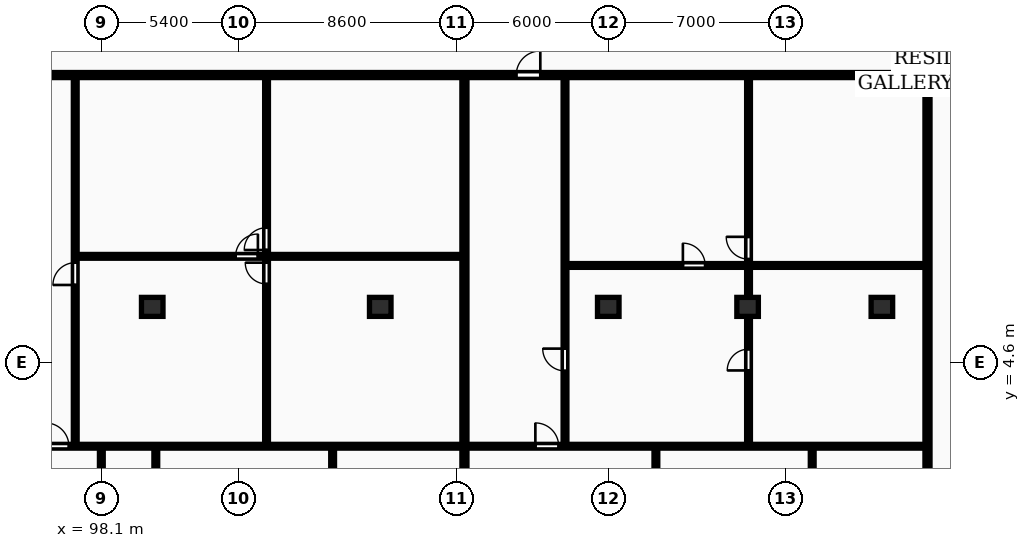
"""IFC4 building model, lengths in metres.
Left out: names, types, materials, properties, quantities, classifications, styles, units other than length and angle.
Written with IfcOpenShell. Run it as: python <this file> out.ifc"""

import sys

from ifc_helpers import new_model, si_unit, direction, frame, frame_2d, origin, origin_2d, place, context, subcontext, project, spatial, rectangle, extrude, element, fill, save


model = new_model("IFC4")
c1 = context("Model", 3, precision=1e-05, world=origin(), true_north=direction((0.0, 1.0)))
c2 = subcontext(c1, "Body", "Model", "MODEL_VIEW")
j1 = project(units=[si_unit("LENGTHUNIT", "METRE"), si_unit("PLANEANGLEUNIT", "RADIAN")], contexts=[c1])
p1 = place(None, origin())
s1 = spatial("IfcSite", under=j1, at=p1, CompositionType="ELEMENT")
p2 = place(p1, origin())
s2 = spatial("IfcBuilding", under=s1, at=p2, CompositionType="ELEMENT")
p3 = place(p2, frame((0.0, 0.0, 119.8)))
s3 = spatial("IfcBuildingStorey", under=s2, at=p3, CompositionType="ELEMENT", Elevation=119.8)
for number, where, z_axis, x_axis in (
    (1, (100.1, 6.8, 0.0), (0.0, 0.0, 1.0), (1.0, 0.0, 0.0)),
    (2, (109.1, 6.8, 0.0), (0.0, 0.0, 1.0), (1.0, 0.0, 0.0)),
    (3, (118.1, 6.8, 0.0), (0.0, 0.0, 1.0), (1.0, 0.0, 0.0)),
    (4, (123.6, 6.8, 0.0), (0.0, 0.0, 1.0), (1.0, 0.0, 0.0)),
    (5, (128.9, 6.8, 0.0), (0.0, 0.0, 1.0), (1.0, 0.0, 0.0)),
):
    element("IfcColumn", number, at=place(p3, frame(where, z_axis=z_axis, x_axis=x_axis)), inside=s3, PredefinedType="COLUMN", context=c2, shape_type="SweptSolid", body=[
        extrude(rectangle(XDim=0.85, YDim=0.75, at=origin_2d()), origin(), (0.0, 0.0, 1.0), 3.25),
    ])
for number, where, z_axis, x_axis in (
    (6, (130.7, -8.7, 0.0), (0.0, 0.0, 1.0), (0.0, 1.0, 0.0)),
    (7, (112.423, -8.7, 0.0), (0.0, 0.0, 1.0), (0.0, 1.0, 0.0)),
):
    element("IfcWall", number, at=place(p3, frame(where, z_axis=z_axis, x_axis=x_axis)), inside=s3, PredefinedType="PARTITIONING", context=c2, shape_type="SweptSolid", body=[
        extrude(rectangle(XDim=24.57, YDim=0.2, at=frame_2d((12.285, 0.0))), origin(), (0.0, 0.0, 1.0), 2.97),
    ])
p4 = place(p3, frame((104.612, 1.34, 0.0), z_axis=(0.0, 0.0, 1.0), x_axis=(0.0, 1.0, 0.0)))
e8 = element("IfcWall", 8, at=p4, inside=s3, PredefinedType="PARTITIONING", context=c2, shape_type="SweptSolid", body=[
    extrude(rectangle(XDim=14.55, YDim=0.15, at=frame_2d((7.275, 0.0))), origin(), (0.0, 0.0, 1.0), 2.97),
])
p5 = place(p4, frame((6.365, 0.0, 0.0)))
e9 = element("IfcOpeningElement", 9, at=p5, cuts=e8, PredefinedType="OPENING", context=c2, shape_type="SweptSolid", body=[
    extrude(rectangle(XDim=0.84, YDim=2.04, at=frame_2d((0.42, 1.02))), frame((0.0, 0.085, 0.0), z_axis=(0.0, -1.0, 0.0), x_axis=(1.0, 0.0, 0.0)), (0.0, 0.0, 1.0), 0.17),
])
p6 = place(p4, frame((7.705, 0.0, 0.0)))
e10 = element("IfcOpeningElement", 10, at=p6, cuts=e8, PredefinedType="OPENING", context=c2, shape_type="SweptSolid", body=[
    extrude(rectangle(XDim=0.88, YDim=2.06, at=frame_2d((0.44, 1.03))), frame((0.0, 0.085, 0.0), z_axis=(0.0, -1.0, 0.0), x_axis=(1.0, 0.0, 0.0)), (0.0, 0.0, 1.0), 0.17),
])
p7 = place(p3, frame((97.121, 8.795, 0.0), z_axis=(0.0, 0.0, 1.0), x_axis=(1.0, 0.0, 0.0)))
e11 = element("IfcWall", 11, at=p7, inside=s3, PredefinedType="PARTITIONING", context=c2, shape_type="SweptSolid", body=[
    extrude(rectangle(XDim=15.222, YDim=0.15, at=frame_2d((7.611, 0.0))), origin(), (0.0, 0.0, 1.0), 2.97),
])
p8 = place(p7, frame((6.27, 0.0, 0.0)))
e12 = element("IfcOpeningElement", 12, at=p8, cuts=e11, PredefinedType="OPENING", context=c2, shape_type="SweptSolid", body=[
    extrude(rectangle(XDim=0.88, YDim=2.06, at=frame_2d((0.44, 1.03))), frame((0.0, 0.085, 0.0), z_axis=(0.0, -1.0, 0.0), x_axis=(1.0, 0.0, 0.0)), (0.0, 0.0, 1.0), 0.17),
])
p9 = place(p3, frame((97.061, 1.34, 0.0), z_axis=(0.0, 0.0, 1.0), x_axis=(0.0, 1.0, 0.0)))
e13 = element("IfcWall", 13, at=p9, inside=s3, PredefinedType="PARTITIONING", context=c2, shape_type="SweptSolid", body=[
    extrude(rectangle(XDim=14.55, YDim=0.15, at=frame_2d((7.275, 0.0))), origin(), (0.0, 0.0, 1.0), 2.97),
])
p10 = place(p9, frame((6.325, 0.0, 0.0)))
e14 = element("IfcOpeningElement", 14, at=p10, cuts=e13, PredefinedType="OPENING", context=c2, shape_type="SweptSolid", body=[
    extrude(rectangle(XDim=0.88, YDim=2.06, at=frame_2d((0.44, 1.03))), frame((0.0, 0.085, 0.0), z_axis=(0.0, -1.0, 0.0), x_axis=(1.0, 0.0, 0.0)), (0.0, 0.0, 1.0), 0.17),
])
p11 = place(p3, frame((100.241, -1.21, 0.0), z_axis=(0.0, 0.0, 1.0), x_axis=(0.0, 1.0, 0.0)))
e15 = element("IfcWall", 15, at=p11, inside=s3, PredefinedType="PARTITIONING", context=c2, shape_type="SweptSolid", body=[
    extrude(rectangle(XDim=2.47, YDim=0.15, at=frame_2d((1.235, 0.0))), origin(), (0.0, 0.0, 1.0), 2.2),
])
p12 = place(p3, frame((98.091, -8.7, 0.0), z_axis=(0.0, 0.0, 1.0), x_axis=(0.0, 1.0, 0.0)))
e16 = element("IfcWall", 16, at=p12, inside=s3, PredefinedType="PARTITIONING", context=c2, shape_type="SweptSolid", body=[
    extrude(rectangle(XDim=9.96, YDim=0.15, at=frame_2d((4.98, 0.0))), origin(), (0.0, 0.0, 1.0), 2.97),
])
p13 = place(p12, frame((6.123, 0.0, 0.0)))
e17 = element("IfcOpeningElement", 17, at=p13, cuts=e16, PredefinedType="OPENING", context=c2, shape_type="SweptSolid", body=[
    extrude(rectangle(XDim=0.92, YDim=2.08, at=frame_2d((0.46, 1.04))), frame((0.0, 0.085, 0.0), z_axis=(0.0, -1.0, 0.0), x_axis=(1.0, 0.0, 0.0)), (0.0, 0.0, 1.0), 0.17),
])
p14 = place(p3, frame((107.22, -1.21, 0.0), z_axis=(0.0, 0.0, 1.0), x_axis=(0.0, 1.0, 0.0)))
e18 = element("IfcWall", 18, at=p14, inside=s3, PredefinedType="PARTITIONING", context=c2, shape_type="SweptSolid", body=[
    extrude(rectangle(XDim=2.47, YDim=0.15, at=frame_2d((1.235, 0.0))), origin(), (0.0, 0.0, 1.0), 2.97),
])
p15 = place(p3, frame((93.171, 1.3, 0.0), z_axis=(0.0, 0.0, 1.0), x_axis=(1.0, 0.0, 0.0)))
e19 = element("IfcWall", 19, at=p15, inside=s3, PredefinedType="PARTITIONING", context=c2, shape_type="SweptSolid", body=[
    extrude(rectangle(XDim=19.172, YDim=0.15, at=frame_2d((9.586, 0.0))), origin(), (0.0, 0.0, 1.0), 2.97),
])
p16 = place(p15, frame((2.72, 0.0, 0.0)))
e20 = element("IfcOpeningElement", 20, at=p16, cuts=e19, PredefinedType="OPENING", context=c2, shape_type="SweptSolid", body=[
    extrude(rectangle(XDim=0.92, YDim=2.08, at=frame_2d((0.46, 1.04))), frame((0.0, 0.085, 0.0), z_axis=(0.0, -1.0, 0.0), x_axis=(1.0, 0.0, 0.0)), (0.0, 0.0, 1.0), 0.17),
])
p17 = place(p3, frame((123.636, 1.34, 0.0), z_axis=(0.0, 0.0, 1.0), x_axis=(0.0, 1.0, 0.0)))
e21 = element("IfcWall", 21, at=p17, inside=s3, PredefinedType="PARTITIONING", context=c2, shape_type="SweptSolid", body=[
    extrude(rectangle(XDim=14.55, YDim=0.15, at=frame_2d((7.275, 0.0))), origin(), (0.0, 0.0, 1.0), 2.2),
])
p18 = place(p17, frame((2.951, 0.0, 0.0)))
e22 = element("IfcOpeningElement", 22, at=p18, cuts=e21, PredefinedType="OPENING", context=c2, shape_type="SweptSolid", body=[
    extrude(rectangle(XDim=0.84, YDim=2.04, at=frame_2d((0.42, 1.02))), frame((0.0, 0.085, 0.0), z_axis=(0.0, -1.0, 0.0), x_axis=(1.0, 0.0, 0.0)), (0.0, 0.0, 1.0), 0.17),
])
p19 = place(p17, frame((7.345, 0.0, 0.0)))
e23 = element("IfcOpeningElement", 23, at=p19, cuts=e21, PredefinedType="OPENING", context=c2, shape_type="SweptSolid", body=[
    extrude(rectangle(XDim=0.88, YDim=2.06, at=frame_2d((0.44, 1.03))), frame((0.0, 0.085, 0.0), z_axis=(0.0, -1.0, 0.0), x_axis=(1.0, 0.0, 0.0)), (0.0, 0.0, 1.0), 0.17),
])
p20 = place(p3, frame((116.453, 8.435, 0.0), z_axis=(0.0, 0.0, 1.0), x_axis=(1.0, 0.0, 0.0)))
e24 = element("IfcWall", 24, at=p20, inside=s3, PredefinedType="PARTITIONING", context=c2, shape_type="SweptSolid", body=[
    extrude(rectangle(XDim=14.167, YDim=0.15, at=frame_2d((7.084, 0.0))), origin(), (0.0, 0.0, 1.0), 2.97),
])
p21 = place(p20, frame((4.593, 0.0, 0.0)))
e25 = element("IfcOpeningElement", 25, at=p21, cuts=e24, PredefinedType="OPENING", context=c2, shape_type="SweptSolid", body=[
    extrude(rectangle(XDim=0.88, YDim=2.06, at=frame_2d((0.44, 1.03))), frame((0.0, 0.085, 0.0), z_axis=(0.0, -1.0, 0.0), x_axis=(1.0, 0.0, 0.0)), (0.0, 0.0, 1.0), 0.17),
])
p22 = place(p3, frame((116.393, 1.34, 0.0), z_axis=(0.0, 0.0, 1.0), x_axis=(0.0, 1.0, 0.0)))
e26 = element("IfcWall", 26, at=p22, inside=s3, PredefinedType="PARTITIONING", context=c2, shape_type="SweptSolid", body=[
    extrude(rectangle(XDim=14.55, YDim=0.15, at=frame_2d((7.275, 0.0))), origin(), (0.0, 0.0, 1.0), 2.97),
])
p23 = place(p22, frame((2.933, 0.0, 0.0)))
e27 = element("IfcOpeningElement", 27, at=p23, cuts=e26, PredefinedType="OPENING", context=c2, shape_type="SweptSolid", body=[
    extrude(rectangle(XDim=0.88, YDim=2.06, at=frame_2d((0.44, 1.03))), frame((0.0, 0.085, 0.0), z_axis=(0.0, -1.0, 0.0), x_axis=(1.0, 0.0, 0.0)), (0.0, 0.0, 1.0), 0.17),
])
p24 = place(p3, frame((119.98, -8.7, 0.0), z_axis=(0.0, 0.0, 1.0), x_axis=(0.0, 1.0, 0.0)))
e28 = element("IfcWall", 28, at=p24, inside=s3, PredefinedType="PARTITIONING", context=c2, shape_type="SweptSolid", body=[
    extrude(rectangle(XDim=9.96, YDim=0.15, at=frame_2d((4.98, 0.0))), origin(), (0.0, 0.0, 1.0), 2.97),
])
p25 = place(p24, frame((6.05, 0.0, 0.0)))
e29 = element("IfcOpeningElement", 29, at=p25, cuts=e28, PredefinedType="OPENING", context=c2, shape_type="SweptSolid", body=[
    extrude(rectangle(XDim=0.92, YDim=2.08, at=frame_2d((0.46, 1.04))), frame((0.0, 0.085, 0.0), z_axis=(0.0, -1.0, 0.0), x_axis=(1.0, 0.0, 0.0)), (0.0, 0.0, 1.0), 0.17),
])
p26 = place(p3, frame((126.15, -1.43, 0.0), z_axis=(0.0, 0.0, 1.0), x_axis=(0.0, 1.0, 0.0)))
e30 = element("IfcWall", 30, at=p26, inside=s3, PredefinedType="PARTITIONING", context=c2, shape_type="SweptSolid", body=[
    extrude(rectangle(XDim=2.69, YDim=0.15, at=frame_2d((1.345, 0.0))), origin(), (0.0, 0.0, 1.0), 2.97),
])
p27 = place(p3, frame((112.503, 1.3, 0.0), z_axis=(0.0, 0.0, 1.0), x_axis=(1.0, 0.0, 0.0)))
e31 = element("IfcWall", 31, at=p27, inside=s3, PredefinedType="PARTITIONING", context=c2, shape_type="SweptSolid", body=[
    extrude(rectangle(XDim=18.117, YDim=0.15, at=frame_2d((9.059, 0.0))), origin(), (0.0, 0.0, 1.0), 2.97),
])
p28 = place(p27, frame((2.72, 0.0, 0.0)))
e32 = element("IfcOpeningElement", 32, at=p28, cuts=e31, PredefinedType="OPENING", context=c2, shape_type="SweptSolid", body=[
    extrude(rectangle(XDim=0.92, YDim=2.08, at=frame_2d((0.46, 1.04))), frame((0.0, 0.085, 0.0), z_axis=(0.0, -1.0, 0.0), x_axis=(1.0, 0.0, 0.0)), (0.0, 0.0, 1.0), 0.17),
])
p29 = place(p3, frame((72.7, 15.95, 0.0), z_axis=(0.0, 0.0, 1.0), x_axis=(1.0, 0.0, 0.0)))
e33 = element("IfcWall", 33, at=p29, inside=s3, PredefinedType="PARTITIONING", context=c2, shape_type="SweptSolid", body=[
    extrude(rectangle(XDim=58.0, YDim=0.2, at=frame_2d((29.0, 0.0))), origin(), (0.0, 0.0, 1.0), 2.97),
])
p30 = place(p29, frame((6.39, 0.0, 0.0)))
e34 = element("IfcOpeningElement", 34, at=p30, cuts=e33, PredefinedType="OPENING", context=c2, shape_type="SweptSolid", body=[
    extrude(rectangle(XDim=1.22, YDim=2.18, at=frame_2d((0.61, 1.09))), frame((0.0, 0.11, 0.0), z_axis=(0.0, -1.0, 0.0), x_axis=(1.0, 0.0, 0.0)), (0.0, 0.0, 1.0), 0.22),
])
p31 = place(p29, frame((22.436, 0.0, 0.0)))
e35 = element("IfcOpeningElement", 35, at=p31, cuts=e33, PredefinedType="OPENING", context=c2, shape_type="SweptSolid", body=[
    extrude(rectangle(XDim=0.95, YDim=2.15, at=frame_2d((0.475, 1.075))), frame((0.0, 0.11, 0.0), z_axis=(0.0, -1.0, 0.0), x_axis=(1.0, 0.0, 0.0)), (0.0, 0.0, 1.0), 0.22),
])
p32 = place(p29, frame((41.768, 0.0, 0.0)))
e36 = element("IfcOpeningElement", 36, at=p32, cuts=e33, PredefinedType="OPENING", context=c2, shape_type="SweptSolid", body=[
    extrude(rectangle(XDim=0.95, YDim=2.15, at=frame_2d((0.475, 1.075))), frame((0.0, 0.11, 0.0), z_axis=(0.0, -1.0, 0.0), x_axis=(1.0, 0.0, 0.0)), (0.0, 0.0, 1.0), 0.22),
])
p33 = place(p5, origin())
e37 = element("IfcDoor", 37, at=p33, inside=s3, OperationType="SINGLE_SWING_RIGHT", PredefinedType="DOOR", context=c2, shape_type="SweptSolid", body=[
    extrude(rectangle(XDim=0.84, YDim=2.04, at=frame_2d((0.42, 1.02))), frame((0.0, 0.025, 0.0), z_axis=(0.0, -1.0, 0.0), x_axis=(1.0, 0.0, 0.0)), (0.0, 0.0, 1.0), 0.05),
])
fill(e9, e37)
p34 = place(p6, origin())
e38 = element("IfcDoor", 38, at=p34, inside=s3, OperationType="SINGLE_SWING_LEFT", PredefinedType="DOOR", context=c2, shape_type="SweptSolid", body=[
    extrude(rectangle(XDim=0.88, YDim=2.06, at=frame_2d((0.44, 1.03))), frame((0.0, 0.025, 0.0), z_axis=(0.0, -1.0, 0.0), x_axis=(1.0, 0.0, 0.0)), (0.0, 0.0, 1.0), 0.05),
])
fill(e10, e38)
p35 = place(p8, origin())
e39 = element("IfcDoor", 39, at=p35, inside=s3, OperationType="SINGLE_SWING_RIGHT", PredefinedType="DOOR", context=c2, shape_type="SweptSolid", body=[
    extrude(rectangle(XDim=0.88, YDim=2.06, at=frame_2d((0.44, 1.03))), frame((0.0, 0.025, 0.0), z_axis=(0.0, -1.0, 0.0), x_axis=(1.0, 0.0, 0.0)), (0.0, 0.0, 1.0), 0.05),
])
fill(e12, e39)
p36 = place(p10, origin())
e40 = element("IfcDoor", 40, at=p36, inside=s3, OperationType="SINGLE_SWING_LEFT", PredefinedType="DOOR", context=c2, shape_type="SweptSolid", body=[
    extrude(rectangle(XDim=0.88, YDim=2.06, at=frame_2d((0.44, 1.03))), frame((0.0, 0.025, 0.0), z_axis=(0.0, -1.0, 0.0), x_axis=(1.0, 0.0, 0.0)), (0.0, 0.0, 1.0), 0.05),
])
fill(e14, e40)
p37 = place(p16, origin())
e41 = element("IfcDoor", 41, at=p37, inside=s3, OperationType="SINGLE_SWING_LEFT", PredefinedType="DOOR", context=c2, shape_type="SweptSolid", body=[
    extrude(rectangle(XDim=0.92, YDim=2.08, at=frame_2d((0.46, 1.04))), frame((0.0, 0.025, 0.0), z_axis=(0.0, -1.0, 0.0), x_axis=(1.0, 0.0, 0.0)), (0.0, 0.0, 1.0), 0.05),
])
fill(e20, e41)
p38 = place(p18, origin())
e42 = element("IfcDoor", 42, at=p38, inside=s3, OperationType="SINGLE_SWING_LEFT", PredefinedType="DOOR", context=c2, shape_type="SweptSolid", body=[
    extrude(rectangle(XDim=0.84, YDim=2.04, at=frame_2d((0.42, 1.02))), frame((0.0, 0.025, 0.0), z_axis=(0.0, -1.0, 0.0), x_axis=(1.0, 0.0, 0.0)), (0.0, 0.0, 1.0), 0.05),
])
fill(e22, e42)
p39 = place(p19, origin())
e43 = element("IfcDoor", 43, at=p39, inside=s3, OperationType="SINGLE_SWING_RIGHT", PredefinedType="DOOR", context=c2, shape_type="SweptSolid", body=[
    extrude(rectangle(XDim=0.88, YDim=2.06, at=frame_2d((0.44, 1.03))), frame((0.0, 0.025, 0.0), z_axis=(0.0, -1.0, 0.0), x_axis=(1.0, 0.0, 0.0)), (0.0, 0.0, 1.0), 0.05),
])
fill(e23, e43)
p40 = place(p21, origin())
e44 = element("IfcDoor", 44, at=p40, inside=s3, OperationType="SINGLE_SWING_LEFT", PredefinedType="DOOR", context=c2, shape_type="SweptSolid", body=[
    extrude(rectangle(XDim=0.88, YDim=2.06, at=frame_2d((0.44, 1.03))), frame((0.0, 0.025, 0.0), z_axis=(0.0, -1.0, 0.0), x_axis=(1.0, 0.0, 0.0)), (0.0, 0.0, 1.0), 0.05),
])
fill(e25, e44)
p41 = place(p23, origin())
e45 = element("IfcDoor", 45, at=p41, inside=s3, OperationType="SINGLE_SWING_RIGHT", PredefinedType="DOOR", context=c2, shape_type="SweptSolid", body=[
    extrude(rectangle(XDim=0.88, YDim=2.06, at=frame_2d((0.44, 1.03))), frame((0.0, 0.025, 0.0), z_axis=(0.0, -1.0, 0.0), x_axis=(1.0, 0.0, 0.0)), (0.0, 0.0, 1.0), 0.05),
])
fill(e27, e45)
p42 = place(p28, origin())
e46 = element("IfcDoor", 46, at=p42, inside=s3, OperationType="SINGLE_SWING_LEFT", PredefinedType="DOOR", context=c2, shape_type="SweptSolid", body=[
    extrude(rectangle(XDim=0.92, YDim=2.08, at=frame_2d((0.46, 1.04))), frame((0.0, 0.025, 0.0), z_axis=(0.0, -1.0, 0.0), x_axis=(1.0, 0.0, 0.0)), (0.0, 0.0, 1.0), 0.05),
])
fill(e32, e46)
p43 = place(p32, origin())
e47 = element("IfcDoor", 47, at=p43, inside=s3, OperationType="SINGLE_SWING_RIGHT", PredefinedType="DOOR", context=c2, shape_type="SweptSolid", body=[
    extrude(rectangle(XDim=0.95, YDim=2.15, at=frame_2d((0.475, 1.075))), frame((0.0, 0.025, 0.0), z_axis=(0.0, -1.0, 0.0), x_axis=(1.0, 0.0, 0.0)), (0.0, 0.0, 1.0), 0.05),
])
fill(e36, e47)
save(model, sys.argv[1])
